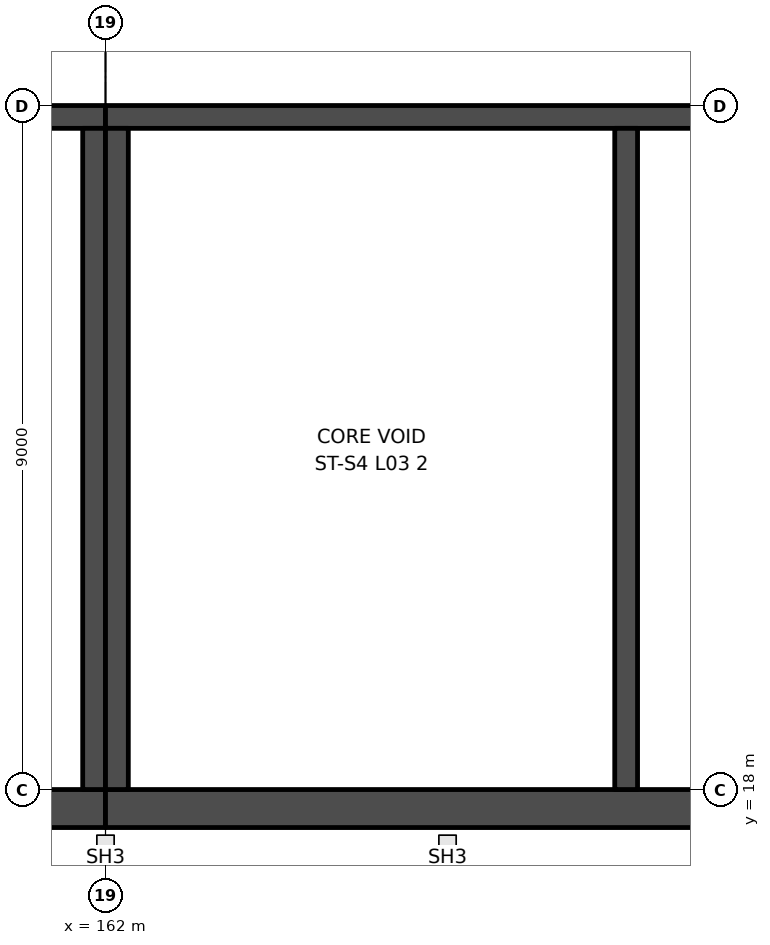
"""IFC4 building model, lengths in metres.
Left out: names, types, materials, properties, quantities, classifications, styles, units other than length and angle.
Written with IfcOpenShell. Run it as: python <this file> out.ifc"""

import sys

from ifc_helpers import new_model, si_unit, direction, frame, frame_2d, origin, place, context, subcontext, project, spatial, rectangle, extrude, element, save


model = new_model("IFC4")
c1 = context("Model", 3, precision=1e-05, world=origin(), true_north=direction((0.0, 1.0)))
c2 = subcontext(c1, "Body", "Model", "MODEL_VIEW")
j1 = project(units=[si_unit("LENGTHUNIT", "METRE"), si_unit("PLANEANGLEUNIT", "RADIAN")], contexts=[c1])
p1 = place(None, origin())
s1 = spatial("IfcSite", under=j1, at=p1, CompositionType="ELEMENT")
p2 = place(p1, origin())
s2 = spatial("IfcBuilding", under=s1, at=p2, CompositionType="ELEMENT")
p3 = place(p2, frame((0.0, 0.0, 22.0)))
s3 = spatial("IfcBuildingStorey", under=s2, at=p3, CompositionType="ELEMENT", Elevation=22.0)
p4 = place(p3, frame((144.0, 26.85, 0.0), z_axis=(0.0, 0.0, 1.0), x_axis=(1.0, 0.0, 0.0)))
e1 = element("IfcWall", 1, at=p4, inside=s3, PredefinedType="SHEAR", context=c2, shape_type="SweptSolid", body=[
    extrude(rectangle(XDim=18.0, YDim=0.3, at=frame_2d((9.0, 0.0))), origin(), (0.0, 0.0, 1.0), 6.0),
])
p5 = place(p4, frame((8.6, 0.0, 0.0)))
e2 = element("IfcOpeningElement", 2, at=p5, cuts=e1, PredefinedType="OPENING", context=c2, shape_type="SweptSolid", body=[
    extrude(rectangle(XDim=1.2, YDim=2.1, at=frame_2d((0.6, 1.05))), frame((0.0, 0.16, 0.0), z_axis=(0.0, -1.0, 0.0), x_axis=(1.0, 0.0, 0.0)), (0.0, 0.0, 1.0), 0.32),
])
p6 = place(p3, frame((144.0, 17.75, 0.0), z_axis=(0.0, 0.0, 1.0), x_axis=(1.0, 0.0, 0.0)))
e3 = element("IfcWall", 3, at=p6, inside=s3, PredefinedType="SHEAR", context=c2, shape_type="SweptSolid", body=[
    extrude(rectangle(XDim=18.0, YDim=0.5, at=frame_2d((9.0, 0.0))), origin(), (0.0, 0.0, 1.0), 6.0),
])
p7 = place(p3, frame((161.85, 26.7, 0.0), z_axis=(0.0, 0.0, 1.0), x_axis=(0.0, -1.0, 0.0)))
e4 = element("IfcWall", 4, at=p7, inside=s3, PredefinedType="SHEAR", context=c2, shape_type="SweptSolid", body=[
    extrude(rectangle(XDim=8.7, YDim=0.3, at=frame_2d((4.35, 0.0))), origin(), (0.0, 0.0, 1.0), 6.0),
])
p8 = place(p3, frame((180.0, 26.85, 0.0), z_axis=(0.0, 0.0, 1.0), x_axis=(-1.0, 0.0, 0.0)))
e5 = element("IfcWall", 5, at=p8, inside=s3, PredefinedType="SHEAR", context=c2, shape_type="SweptSolid", body=[
    extrude(rectangle(XDim=18.0, YDim=0.3, at=frame_2d((9.0, 0.0))), origin(), (0.0, 0.0, 1.0), 6.0),
])
p9 = place(p8, frame((1.5, 0.0, 0.0)))
e6 = element("IfcOpeningElement", 6, at=p9, cuts=e5, PredefinedType="OPENING", context=c2, shape_type="SweptSolid", body=[
    extrude(rectangle(XDim=1.2, YDim=2.1, at=frame_2d((0.6, 1.05))), frame((0.0, 0.16, 0.0), z_axis=(0.0, -1.0, 0.0), x_axis=(1.0, 0.0, 0.0)), (0.0, 0.0, 1.0), 0.32),
])
p10 = place(p3, frame((180.0, 17.75, 0.0), z_axis=(0.0, 0.0, 1.0), x_axis=(-1.0, 0.0, 0.0)))
e7 = element("IfcWall", 7, at=p10, inside=s3, PredefinedType="SHEAR", context=c2, shape_type="SweptSolid", body=[
    extrude(rectangle(XDim=18.0, YDim=0.5, at=frame_2d((9.0, 0.0))), origin(), (0.0, 0.0, 1.0), 6.0),
])
for number, where, z_axis, x_axis in (
    (8, (162.15, 26.7, 0.0), (0.0, 0.0, 1.0), (0.0, -1.0, 0.0)),
    (9, (168.85, 26.7, 0.0), (0.0, 0.0, 1.0), (0.0, -1.0, 0.0)),
):
    element("IfcWall", number, at=place(p3, frame(where, z_axis=z_axis, x_axis=x_axis)), inside=s3, PredefinedType="SHEAR", context=c2, shape_type="SweptSolid", body=[
        extrude(rectangle(XDim=8.7, YDim=0.3, at=frame_2d((4.35, 0.0))), origin(), (0.0, 0.0, 1.0), 6.0),
    ])
save(model, sys.argv[1])
